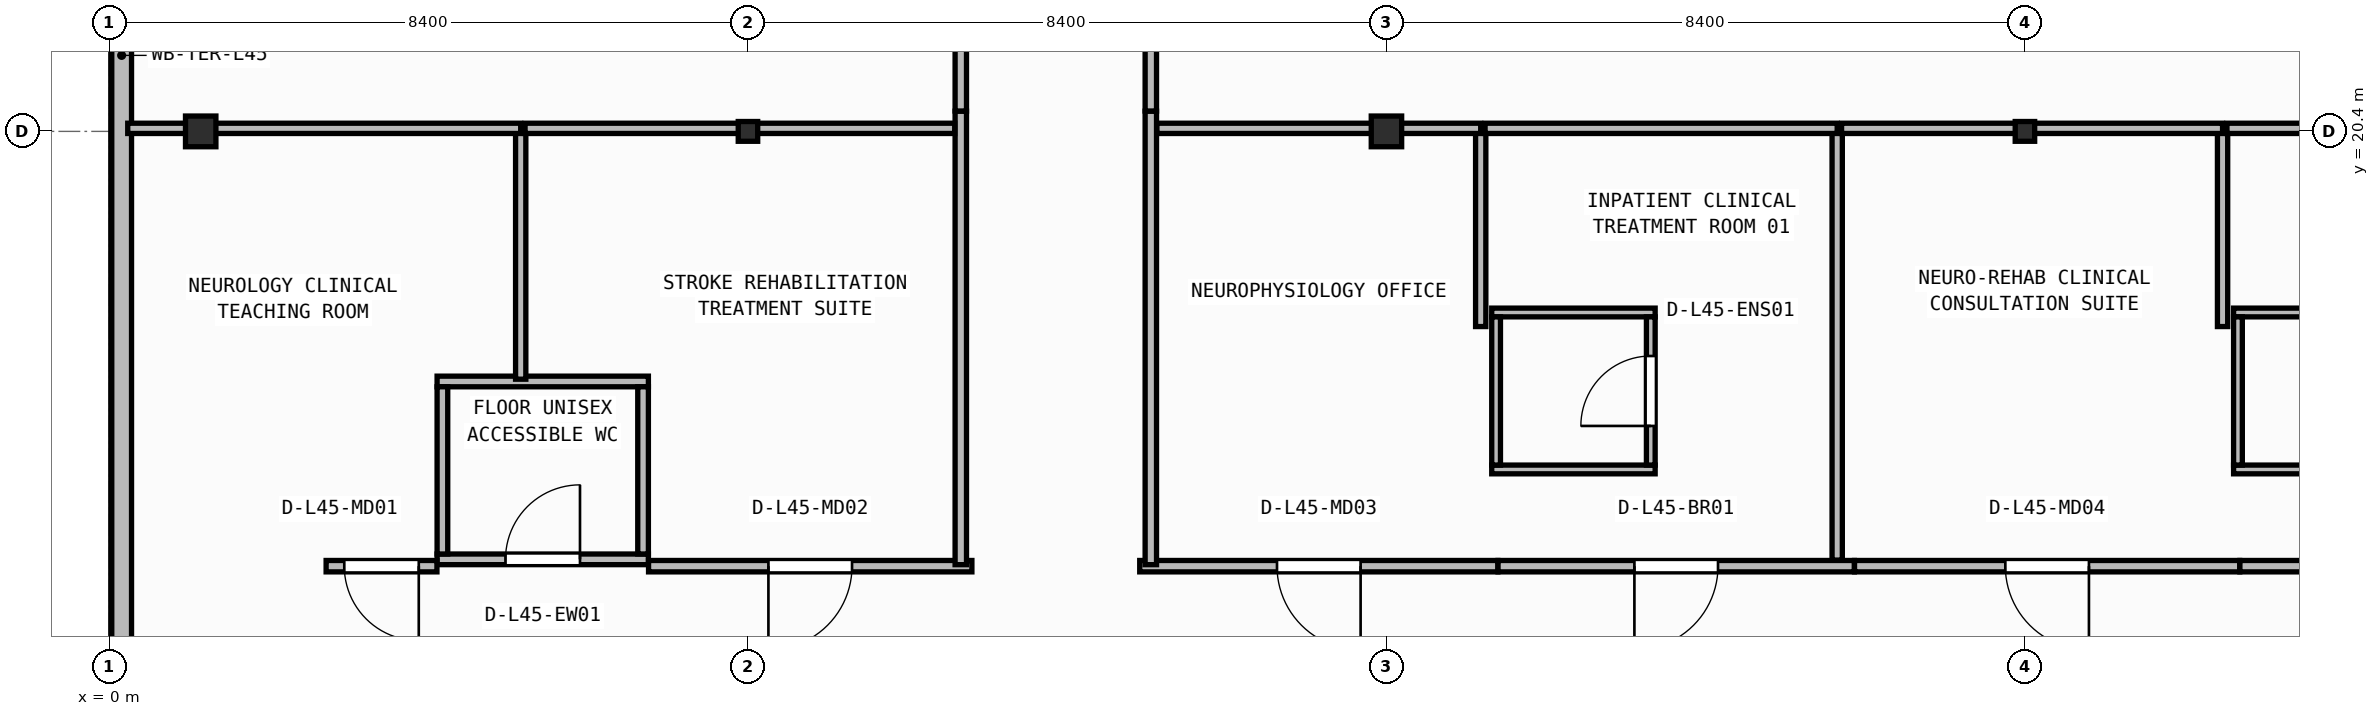
"""IFC4 building model, lengths in metres.
Left out: names, types, materials, properties, quantities, classifications, styles, units other than length and angle.
Written with IfcOpenShell. Run it as: python <this file> out.ifc"""

import sys

from ifc_helpers import new_model, si_unit, direction, frame, frame_2d, origin, origin_2d, place, context, subcontext, project, spatial, rectangle, i_section, extrude, element, fill, save


model = new_model("IFC4")
c1 = context("Model", 3, precision=1e-05, world=origin(), true_north=direction((0.0, 1.0)))
c2 = subcontext(c1, "Body", "Model", "MODEL_VIEW")
j1 = project(units=[si_unit("LENGTHUNIT", "METRE"), si_unit("PLANEANGLEUNIT", "RADIAN")], contexts=[c1])
p1 = place(None, origin())
s1 = spatial("IfcSite", under=j1, at=p1, CompositionType="ELEMENT")
p2 = place(p1, origin())
s2 = spatial("IfcBuilding", under=s1, at=p2, CompositionType="ELEMENT")
p3 = place(p2, frame((0.0, 0.0, 184.2)))
s3 = spatial("IfcBuildingStorey", under=s2, at=p3, CompositionType="ELEMENT", Elevation=184.2)
p4 = place(p3, frame((1.2, 20.4, 0.0), z_axis=(0.0, 0.0, 1.0), x_axis=(1.0, 0.0, 0.0)))
e1 = element("IfcColumn", 1, at=p4, inside=s3, PredefinedType="COLUMN", context=c2, shape_type="SweptSolid", body=[
    extrude(i_section(OverallWidth=0.4, OverallDepth=0.404, WebThickness=0.02, FlangeThickness=0.032, at=origin_2d()), origin(), (0.0, 0.0, 1.0), 3.95),
])
p5 = place(p3, frame((8.4, 20.4, 0.0), z_axis=(0.0, 0.0, 1.0), x_axis=(1.0, 0.0, 0.0)))
e2 = element("IfcColumn", 2, at=p5, inside=s3, PredefinedType="COLUMN", context=c2, shape_type="SweptSolid", body=[
    extrude(i_section(OverallWidth=0.256, OverallDepth=0.26, WebThickness=0.01, FlangeThickness=0.017, FilletRadius=0.013, at=origin_2d()), origin(), (0.0, 0.0, 1.0), 3.95),
])
p6 = place(p3, frame((16.8, 20.4, 0.0), z_axis=(0.0, 0.0, 1.0), x_axis=(1.0, 0.0, 0.0)))
e3 = element("IfcColumn", 3, at=p6, inside=s3, PredefinedType="COLUMN", context=c2, shape_type="SweptSolid", body=[
    extrude(i_section(OverallWidth=0.4, OverallDepth=0.404, WebThickness=0.02, FlangeThickness=0.032, at=origin_2d()), origin(), (0.0, 0.0, 1.0), 3.95),
])
p7 = place(p3, frame((25.2, 20.4, 0.0), z_axis=(0.0, 0.0, 1.0), x_axis=(1.0, 0.0, 0.0)))
e4 = element("IfcColumn", 4, at=p7, inside=s3, PredefinedType="COLUMN", context=c2, shape_type="SweptSolid", body=[
    extrude(i_section(OverallWidth=0.256, OverallDepth=0.26, WebThickness=0.01, FlangeThickness=0.017, FilletRadius=0.013, at=origin_2d()), origin(), (0.0, 0.0, 1.0), 3.95),
])
p8 = place(p3, frame((0.16, 40.14, 0.0), z_axis=(0.0, 0.0, 1.0), x_axis=(0.0, -1.0, 0.0)))
e5 = element("IfcWall", 5, at=p8, inside=s3, PredefinedType="STANDARD", context=c2, shape_type="SweptSolid", body=[
    extrude(rectangle(XDim=37.48, YDim=0.26, at=frame_2d((18.74, 0.0))), origin(), (0.0, 0.0, 1.0), 3.71),
])
p9 = place(p8, frame((6.638, 0.0, 0.0)))
e6 = element("IfcOpeningElement", 6, at=p9, cuts=e5, PredefinedType="OPENING", context=c2, shape_type="SweptSolid", body=[
    extrude(rectangle(XDim=1.3, YDim=2.15, at=frame_2d((0.65, 1.075))), frame((0.0, 0.14, 0.0), z_axis=(0.0, -1.0, 0.0), x_axis=(1.0, 0.0, 0.0)), (0.0, 0.0, 1.0), 0.28),
])
p10 = place(p3, frame((4.31, 14.77, 0.0), z_axis=(0.0, 0.0, 1.0), x_axis=(1.0, 0.0, 0.0)))
e7 = element("IfcWall", 7, at=p10, inside=s3, PredefinedType="PARTITIONING", context=c2, shape_type="SweptSolid", body=[
    extrude(rectangle(XDim=2.78, YDim=0.14, at=frame_2d((1.39, 0.0))), origin(), (0.0, 0.0, 1.0), 3.71),
])
p11 = place(p10, frame((0.9, 0.0, 0.0)))
e8 = element("IfcOpeningElement", 8, at=p11, cuts=e7, PredefinedType="OPENING", context=c2, shape_type="SweptSolid", body=[
    extrude(rectangle(XDim=0.98, YDim=2.1, at=frame_2d((0.49, 1.05))), frame((0.0, 0.08, 0.0), z_axis=(0.0, -1.0, 0.0), x_axis=(1.0, 0.0, 0.0)), (0.0, 0.0, 1.0), 0.16),
])
p12 = place(p3, frame((4.31, 17.11, 0.0), z_axis=(0.0, 0.0, 1.0), x_axis=(1.0, 0.0, 0.0)))
e9 = element("IfcWall", 9, at=p12, inside=s3, PredefinedType="PARTITIONING", context=c2, shape_type="SweptSolid", body=[
    extrude(rectangle(XDim=2.78, YDim=0.14, at=frame_2d((1.39, 0.0))), origin(), (0.0, 0.0, 1.0), 3.71),
])
for number, where, z_axis, x_axis in (
    (10, (4.38, 14.84, 0.0), (0.0, 0.0, 1.0), (0.0, 1.0, 0.0)),
    (11, (7.02, 14.84, 0.0), (0.0, 0.0, 1.0), (0.0, 1.0, 0.0)),
):
    element("IfcWall", number, at=place(p3, frame(where, z_axis=z_axis, x_axis=x_axis)), inside=s3, PredefinedType="PARTITIONING", context=c2, shape_type="SweptSolid", body=[
        extrude(rectangle(XDim=2.2, YDim=0.14, at=frame_2d((1.1, 0.0))), origin(), (0.0, 0.0, 1.0), 3.71),
    ])
for number, where, z_axis, x_axis in (
    (12, (18.185, 15.952, 0.0), (0.0, 0.0, 1.0), (1.0, 0.0, 0.0)),
    (13, (18.185, 18.018, 0.0), (0.0, 0.0, 1.0), (1.0, 0.0, 0.0)),
):
    element("IfcWall", number, at=place(p3, frame(where, z_axis=z_axis, x_axis=x_axis)), inside=s3, PredefinedType="PARTITIONING", context=c2, shape_type="SweptSolid", body=[
        extrude(rectangle(XDim=2.15, YDim=0.115, at=frame_2d((1.075, 0.0))), origin(), (0.0, 0.0, 1.0), 3.71),
    ])
p13 = place(p3, frame((18.242, 16.01, 0.0), z_axis=(0.0, 0.0, 1.0), x_axis=(0.0, 1.0, 0.0)))
e14 = element("IfcWall", 14, at=p13, inside=s3, PredefinedType="PARTITIONING", context=c2, shape_type="SweptSolid", body=[
    extrude(rectangle(XDim=1.95, YDim=0.115, at=frame_2d((0.975, 0.0))), origin(), (0.0, 0.0, 1.0), 3.71),
])
p14 = place(p3, frame((20.278, 16.01, 0.0), z_axis=(0.0, 0.0, 1.0), x_axis=(0.0, 1.0, 0.0)))
e15 = element("IfcWall", 15, at=p14, inside=s3, PredefinedType="PARTITIONING", context=c2, shape_type="SweptSolid", body=[
    extrude(rectangle(XDim=1.95, YDim=0.115, at=frame_2d((0.975, 0.0))), origin(), (0.0, 0.0, 1.0), 3.71),
])
p15 = place(p14, frame((0.515, 0.0, 0.0)))
e16 = element("IfcOpeningElement", 16, at=p15, cuts=e15, PredefinedType="OPENING", context=c2, shape_type="SweptSolid", body=[
    extrude(rectangle(XDim=0.92, YDim=2.1, at=frame_2d((0.46, 1.05))), frame((0.0, 0.067, 0.0), z_axis=(0.0, -1.0, 0.0), x_axis=(1.0, 0.0, 0.0)), (0.0, 0.0, 1.0), 0.135),
])
p16 = place(p3, frame((27.945, 15.952, 0.0), z_axis=(0.0, 0.0, 1.0), x_axis=(1.0, 0.0, 0.0)))
e17 = element("IfcWall", 17, at=p16, inside=s3, PredefinedType="PARTITIONING", context=c2, shape_type="SweptSolid", body=[
    extrude(rectangle(XDim=2.15, YDim=0.115, at=frame_2d((1.075, 0.0))), origin(), (0.0, 0.0, 1.0), 3.381),
])
p17 = place(p3, frame((27.945, 18.018, 0.0), z_axis=(0.0, 0.0, 1.0), x_axis=(1.0, 0.0, 0.0)))
e18 = element("IfcWall", 18, at=p17, inside=s3, PredefinedType="PARTITIONING", context=c2, shape_type="SweptSolid", body=[
    extrude(rectangle(XDim=2.15, YDim=0.115, at=frame_2d((1.075, 0.0))), origin(), (0.0, 0.0, 1.0), 3.71),
])
p18 = place(p3, frame((28.002, 16.01, 0.0), z_axis=(0.0, 0.0, 1.0), x_axis=(0.0, 1.0, 0.0)))
e19 = element("IfcWall", 19, at=p18, inside=s3, PredefinedType="PARTITIONING", context=c2, shape_type="SweptSolid", body=[
    extrude(rectangle(XDim=1.95, YDim=0.115, at=frame_2d((0.975, 0.0))), origin(), (0.0, 0.0, 1.0), 3.71),
])
p19 = place(p3, frame((4.308, 14.68, 0.0), z_axis=(0.0, 0.0, 1.0), x_axis=(-1.0, 0.0, 0.0)))
e20 = element("IfcWall", 20, at=p19, inside=s3, PredefinedType="PARTITIONING", context=c2, shape_type="SweptSolid", body=[
    extrude(rectangle(XDim=1.458, YDim=0.15, at=frame_2d((0.729, 0.0))), origin(), (0.0, 0.0, 1.0), 3.71),
])
p20 = place(p19, frame((0.239, 0.0, 0.0)))
e21 = element("IfcOpeningElement", 21, at=p20, cuts=e20, PredefinedType="OPENING", context=c2, shape_type="SweptSolid", body=[
    extrude(rectangle(XDim=0.98, YDim=2.1, at=frame_2d((0.49, 1.05))), frame((0.0, 0.085, 0.0), z_axis=(0.0, -1.0, 0.0), x_axis=(1.0, 0.0, 0.0)), (0.0, 0.0, 1.0), 0.17),
])
p21 = place(p3, frame((11.346, 14.68, 0.0), z_axis=(0.0, 0.0, 1.0), x_axis=(-1.0, 0.0, 0.0)))
e22 = element("IfcWall", 22, at=p21, inside=s3, PredefinedType="PARTITIONING", context=c2, shape_type="SweptSolid", body=[
    extrude(rectangle(XDim=4.254, YDim=0.15, at=frame_2d((2.127, 0.0))), origin(), (0.0, 0.0, 1.0), 3.71),
])
p22 = place(p21, frame((1.577, 0.0, 0.0)))
e23 = element("IfcOpeningElement", 23, at=p22, cuts=e22, PredefinedType="OPENING", context=c2, shape_type="SweptSolid", body=[
    extrude(rectangle(XDim=1.1, YDim=2.1, at=frame_2d((0.55, 1.05))), frame((0.0, 0.085, 0.0), z_axis=(0.0, -1.0, 0.0), x_axis=(1.0, 0.0, 0.0)), (0.0, 0.0, 1.0), 0.17),
])
p23 = place(p3, frame((18.266, 14.68, 0.0), z_axis=(0.0, 0.0, 1.0), x_axis=(-1.0, 0.0, 0.0)))
e24 = element("IfcWall", 24, at=p23, inside=s3, PredefinedType="PARTITIONING", context=c2, shape_type="SweptSolid", body=[
    extrude(rectangle(XDim=4.712, YDim=0.15, at=frame_2d((2.356, 0.0))), origin(), (0.0, 0.0, 1.0), 3.71),
])
p24 = place(p23, frame((1.806, 0.0, 0.0)))
e25 = element("IfcOpeningElement", 25, at=p24, cuts=e24, PredefinedType="OPENING", context=c2, shape_type="SweptSolid", body=[
    extrude(rectangle(XDim=1.1, YDim=2.1, at=frame_2d((0.55, 1.05))), frame((0.0, 0.085, 0.0), z_axis=(0.0, -1.0, 0.0), x_axis=(1.0, 0.0, 0.0)), (0.0, 0.0, 1.0), 0.17),
])
p25 = place(p3, frame((22.956, 14.68, 0.0), z_axis=(0.0, 0.0, 1.0), x_axis=(-1.0, 0.0, 0.0)))
e26 = element("IfcWall", 26, at=p25, inside=s3, PredefinedType="PARTITIONING", context=c2, shape_type="SweptSolid", body=[
    extrude(rectangle(XDim=4.688, YDim=0.15, at=frame_2d((2.344, 0.0))), origin(), (0.0, 0.0, 1.0), 3.71),
])
p26 = place(p25, frame((1.794, 0.0, 0.0)))
e27 = element("IfcOpeningElement", 27, at=p26, cuts=e26, PredefinedType="OPENING", context=c2, shape_type="SweptSolid", body=[
    extrude(rectangle(XDim=1.1, YDim=2.1, at=frame_2d((0.55, 1.05))), frame((0.0, 0.085, 0.0), z_axis=(0.0, -1.0, 0.0), x_axis=(1.0, 0.0, 0.0)), (0.0, 0.0, 1.0), 0.17),
])
p27 = place(p3, frame((28.026, 14.68, 0.0), z_axis=(0.0, 0.0, 1.0), x_axis=(-1.0, 0.0, 0.0)))
e28 = element("IfcWall", 28, at=p27, inside=s3, PredefinedType="PARTITIONING", context=c2, shape_type="SweptSolid", body=[
    extrude(rectangle(XDim=5.068, YDim=0.15, at=frame_2d((2.534, 0.0))), origin(), (0.0, 0.0, 1.0), 3.71),
])
p28 = place(p27, frame((1.984, 0.0, 0.0)))
e29 = element("IfcOpeningElement", 29, at=p28, cuts=e28, PredefinedType="OPENING", context=c2, shape_type="SweptSolid", body=[
    extrude(rectangle(XDim=1.1, YDim=2.1, at=frame_2d((0.55, 1.05))), frame((0.0, 0.085, 0.0), z_axis=(0.0, -1.0, 0.0), x_axis=(1.0, 0.0, 0.0)), (0.0, 0.0, 1.0), 0.17),
])
p29 = place(p3, frame((32.346, 14.68, 0.0), z_axis=(0.0, 0.0, 1.0), x_axis=(-1.0, 0.0, 0.0)))
e30 = element("IfcWall", 30, at=p29, inside=s3, PredefinedType="PARTITIONING", context=c2, shape_type="SweptSolid", body=[
    extrude(rectangle(XDim=4.318, YDim=0.15, at=frame_2d((2.159, 0.0))), origin(), (0.0, 0.0, 1.0), 3.71),
])
p30 = place(p29, frame((1.609, 0.0, 0.0)))
e31 = element("IfcOpeningElement", 31, at=p30, cuts=e30, PredefinedType="OPENING", context=c2, shape_type="SweptSolid", body=[
    extrude(rectangle(XDim=1.1, YDim=2.1, at=frame_2d((0.55, 1.05))), frame((0.0, 0.085, 0.0), z_axis=(0.0, -1.0, 0.0), x_axis=(1.0, 0.0, 0.0)), (0.0, 0.0, 1.0), 0.17),
])
for number, where, z_axis, x_axis in (
    (32, (11.2, 20.666, 0.0), (0.0, 0.0, 1.0), (0.0, -1.0, 0.0)),
    (33, (13.7, 14.7, 0.0), (0.0, 0.0, 1.0), (0.0, 1.0, 0.0)),
):
    element("IfcWall", number, at=place(p3, frame(where, z_axis=z_axis, x_axis=x_axis)), inside=s3, PredefinedType="PARTITIONING", context=c2, shape_type="SweptSolid", body=[
        extrude(rectangle(XDim=5.966, YDim=0.15, at=frame_2d((2.983, 0.0))), origin(), (0.0, 0.0, 1.0), 3.71),
    ])
p31 = place(p3, frame((11.2, 27.26, 0.0), z_axis=(0.0, 0.0, 1.0), x_axis=(0.0, -1.0, 0.0)))
e34 = element("IfcWall", 34, at=p31, inside=s3, PredefinedType="PARTITIONING", context=c2, shape_type="SweptSolid", body=[
    extrude(rectangle(XDim=6.592, YDim=0.15, at=frame_2d((3.296, 0.0))), origin(), (0.0, 0.0, 1.0), 3.71),
])
p32 = place(p31, frame((2.746, 0.0, 0.0)))
e35 = element("IfcOpeningElement", 35, at=p32, cuts=e34, PredefinedType="OPENING", context=c2, shape_type="SweptSolid", body=[
    extrude(rectangle(XDim=1.1, YDim=2.1, at=frame_2d((0.55, 1.05))), frame((0.0, 0.085, 0.0), z_axis=(0.0, -1.0, 0.0), x_axis=(1.0, 0.0, 0.0)), (0.0, 0.0, 1.0), 0.17),
])
p33 = place(p3, frame((13.7, 20.668, 0.0), z_axis=(0.0, 0.0, 1.0), x_axis=(0.0, 1.0, 0.0)))
e36 = element("IfcWall", 36, at=p33, inside=s3, PredefinedType="PARTITIONING", context=c2, shape_type="SweptSolid", body=[
    extrude(rectangle(XDim=6.592, YDim=0.15, at=frame_2d((3.296, 0.0))), origin(), (0.0, 0.0, 1.0), 3.71),
])
p34 = place(p33, frame((2.746, 0.0, 0.0)))
e37 = element("IfcOpeningElement", 37, at=p34, cuts=e36, PredefinedType="OPENING", context=c2, shape_type="SweptSolid", body=[
    extrude(rectangle(XDim=1.1, YDim=2.1, at=frame_2d((0.55, 1.05))), frame((0.0, 0.085, 0.0), z_axis=(0.0, -1.0, 0.0), x_axis=(1.0, 0.0, 0.0)), (0.0, 0.0, 1.0), 0.17),
])
p35 = place(p3, frame((5.41, 17.14, 0.0), z_axis=(0.0, 0.0, 1.0), x_axis=(0.0, 1.0, 0.0)))
e38 = element("IfcWall", 38, at=p35, inside=s3, PredefinedType="PARTITIONING", context=c2, shape_type="SweptSolid", body=[
    extrude(rectangle(XDim=3.3, YDim=0.135, at=frame_2d((1.65, 0.0))), origin(), (0.0, 0.0, 1.0), 3.71),
])
p36 = place(p3, frame((5.41, 20.44, 0.0), z_axis=(0.0, 0.0, 1.0), x_axis=(-1.0, 0.0, 0.0)))
e39 = element("IfcWall", 39, at=p36, inside=s3, PredefinedType="PARTITIONING", context=c2, shape_type="SweptSolid", body=[
    extrude(rectangle(XDim=5.17, YDim=0.135, at=frame_2d((2.585, 0.0))), origin(), (0.0, 0.0, 1.0), 3.152),
])
p37 = place(p3, frame((11.12, 20.44, 0.0), z_axis=(0.0, 0.0, 1.0), x_axis=(-1.0, 0.0, 0.0)))
e40 = element("IfcWall", 40, at=p37, inside=s3, PredefinedType="PARTITIONING", context=c2, shape_type="SweptSolid", body=[
    extrude(rectangle(XDim=5.653, YDim=0.135, at=frame_2d((2.826, 0.0))), origin(), (0.0, 0.0, 1.0), 3.152),
])
p38 = place(p3, frame((18.04, 17.833, 0.0), z_axis=(0.0, 0.0, 1.0), x_axis=(0.0, 1.0, 0.0)))
e41 = element("IfcWall", 41, at=p38, inside=s3, PredefinedType="PARTITIONING", context=c2, shape_type="SweptSolid", body=[
    extrude(rectangle(XDim=2.607, YDim=0.135, at=frame_2d((1.304, 0.0))), origin(), (0.0, 0.0, 1.0), 3.71),
])
p39 = place(p3, frame((18.04, 20.44, 0.0), z_axis=(0.0, 0.0, 1.0), x_axis=(-1.0, 0.0, 0.0)))
e42 = element("IfcWall", 42, at=p39, inside=s3, PredefinedType="PARTITIONING", context=c2, shape_type="SweptSolid", body=[
    extrude(rectangle(XDim=4.26, YDim=0.135, at=frame_2d((2.13, 0.0))), origin(), (0.0, 0.0, 1.0), 3.152),
])
p40 = place(p3, frame((22.73, 14.76, 0.0), z_axis=(0.0, 0.0, 1.0), x_axis=(0.0, 1.0, 0.0)))
e43 = element("IfcWall", 43, at=p40, inside=s3, PredefinedType="PARTITIONING", context=c2, shape_type="SweptSolid", body=[
    extrude(rectangle(XDim=5.68, YDim=0.135, at=frame_2d((2.84, 0.0))), origin(), (0.0, 0.0, 1.0), 3.71),
])
p41 = place(p3, frame((22.73, 20.44, 0.0), z_axis=(0.0, 0.0, 1.0), x_axis=(-1.0, 0.0, 0.0)))
e44 = element("IfcWall", 44, at=p41, inside=s3, PredefinedType="PARTITIONING", context=c2, shape_type="SweptSolid", body=[
    extrude(rectangle(XDim=4.633, YDim=0.135, at=frame_2d((2.316, 0.0))), origin(), (0.0, 0.0, 1.0), 3.152),
])
p42 = place(p3, frame((27.8, 17.833, 0.0), z_axis=(0.0, 0.0, 1.0), x_axis=(0.0, 1.0, 0.0)))
e45 = element("IfcWall", 45, at=p42, inside=s3, PredefinedType="PARTITIONING", context=c2, shape_type="SweptSolid", body=[
    extrude(rectangle(XDim=2.607, YDim=0.135, at=frame_2d((1.304, 0.0))), origin(), (0.0, 0.0, 1.0), 3.71),
])
p43 = place(p3, frame((27.8, 20.44, 0.0), z_axis=(0.0, 0.0, 1.0), x_axis=(-1.0, 0.0, 0.0)))
e46 = element("IfcWall", 46, at=p43, inside=s3, PredefinedType="PARTITIONING", context=c2, shape_type="SweptSolid", body=[
    extrude(rectangle(XDim=5.012, YDim=0.135, at=frame_2d((2.506, 0.0))), origin(), (0.0, 0.0, 1.0), 3.152),
])
p44 = place(p3, frame((30.137, 20.44, 0.0), z_axis=(0.0, 0.0, 1.0), x_axis=(-1.0, 0.0, 0.0)))
e47 = element("IfcWall", 47, at=p44, inside=s3, PredefinedType="PARTITIONING", context=c2, shape_type="SweptSolid", body=[
    extrude(rectangle(XDim=2.28, YDim=0.135, at=frame_2d((1.14, 0.0))), origin(), (0.0, 0.0, 1.0), 3.152),
])
p45 = place(p11, origin())
e48 = element("IfcDoor", 48, at=p45, inside=s3, OperationType="SINGLE_SWING_RIGHT", PredefinedType="DOOR", context=c2, shape_type="SweptSolid", body=[
    extrude(rectangle(XDim=0.98, YDim=2.1, at=frame_2d((0.49, 1.05))), frame((0.0, 0.025, 0.0), z_axis=(0.0, -1.0, 0.0), x_axis=(1.0, 0.0, 0.0)), (0.0, 0.0, 1.0), 0.05),
])
fill(e8, e48)
p46 = place(p15, origin())
e49 = element("IfcDoor", 49, at=p46, inside=s3, OperationType="SINGLE_SWING_LEFT", PredefinedType="DOOR", context=c2, shape_type="SweptSolid", body=[
    extrude(rectangle(XDim=0.92, YDim=2.1, at=frame_2d((0.46, 1.05))), frame((0.0, 0.025, 0.0), z_axis=(0.0, -1.0, 0.0), x_axis=(1.0, 0.0, 0.0)), (0.0, 0.0, 1.0), 0.05),
])
fill(e16, e49)
p47 = place(p20, origin())
e50 = element("IfcDoor", 50, at=p47, inside=s3, OperationType="SINGLE_SWING_LEFT", PredefinedType="DOOR", context=c2, shape_type="SweptSolid", body=[
    extrude(rectangle(XDim=0.98, YDim=2.1, at=frame_2d((0.49, 1.05))), frame((0.0, 0.025, 0.0), z_axis=(0.0, -1.0, 0.0), x_axis=(1.0, 0.0, 0.0)), (0.0, 0.0, 1.0), 0.05),
])
fill(e21, e50)
p48 = place(p22, origin())
e51 = element("IfcDoor", 51, at=p48, inside=s3, OperationType="SINGLE_SWING_RIGHT", PredefinedType="DOOR", context=c2, shape_type="SweptSolid", body=[
    extrude(rectangle(XDim=1.1, YDim=2.1, at=frame_2d((0.55, 1.05))), frame((0.0, 0.025, 0.0), z_axis=(0.0, -1.0, 0.0), x_axis=(1.0, 0.0, 0.0)), (0.0, 0.0, 1.0), 0.05),
])
fill(e23, e51)
p49 = place(p24, origin())
e52 = element("IfcDoor", 52, at=p49, inside=s3, OperationType="SINGLE_SWING_LEFT", PredefinedType="DOOR", context=c2, shape_type="SweptSolid", body=[
    extrude(rectangle(XDim=1.1, YDim=2.1, at=frame_2d((0.55, 1.05))), frame((0.0, 0.025, 0.0), z_axis=(0.0, -1.0, 0.0), x_axis=(1.0, 0.0, 0.0)), (0.0, 0.0, 1.0), 0.05),
])
fill(e25, e52)
p50 = place(p26, origin())
e53 = element("IfcDoor", 53, at=p50, inside=s3, OperationType="SINGLE_SWING_RIGHT", PredefinedType="DOOR", context=c2, shape_type="SweptSolid", body=[
    extrude(rectangle(XDim=1.1, YDim=2.1, at=frame_2d((0.55, 1.05))), frame((0.0, 0.025, 0.0), z_axis=(0.0, -1.0, 0.0), x_axis=(1.0, 0.0, 0.0)), (0.0, 0.0, 1.0), 0.05),
])
fill(e27, e53)
p51 = place(p28, origin())
e54 = element("IfcDoor", 54, at=p51, inside=s3, OperationType="SINGLE_SWING_LEFT", PredefinedType="DOOR", context=c2, shape_type="SweptSolid", body=[
    extrude(rectangle(XDim=1.1, YDim=2.1, at=frame_2d((0.55, 1.05))), frame((0.0, 0.025, 0.0), z_axis=(0.0, -1.0, 0.0), x_axis=(1.0, 0.0, 0.0)), (0.0, 0.0, 1.0), 0.05),
])
fill(e29, e54)
save(model, sys.argv[1])
